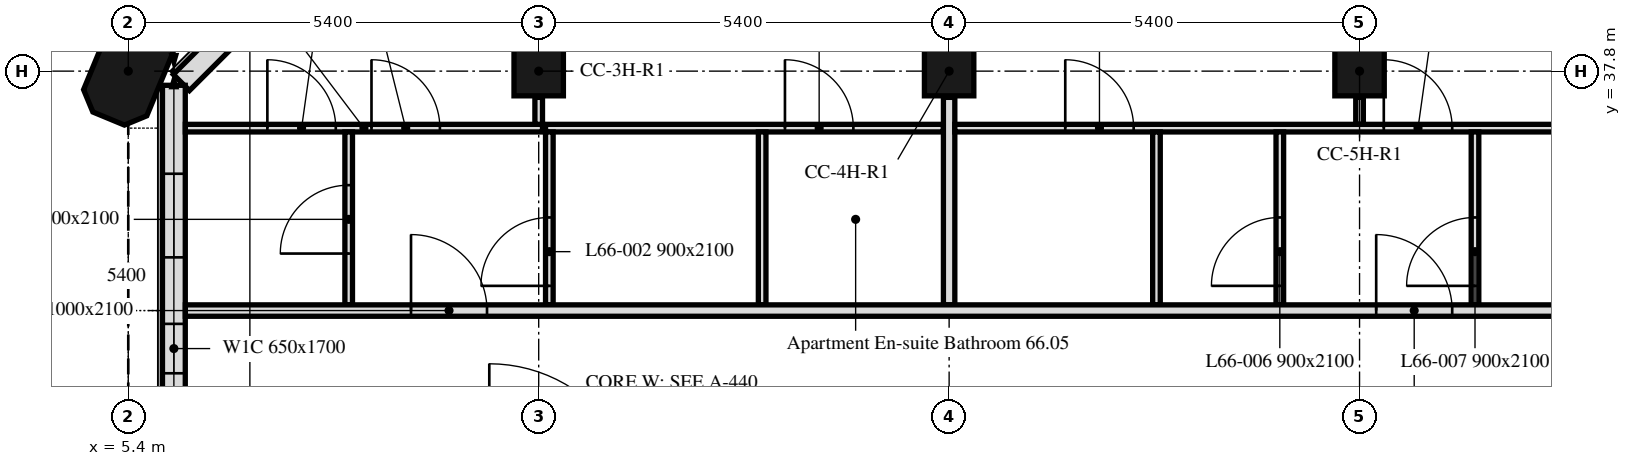
"""IFC4 building model, lengths in metres.
Left out: names, types, materials, properties, quantities, classifications, styles, units other than length and angle.
Written with IfcOpenShell. Run it as: python <this file> out.ifc"""

import sys

from ifc_helpers import new_model, si_unit, direction, frame, frame_2d, origin, origin_2d, place, context, subcontext, project, spatial, polyline, rectangle, outline, extrude, element, fill, save


model = new_model("IFC4")
c1 = context("Model", 3, precision=1e-05, world=origin(), true_north=direction((0.0, 1.0)))
c2 = subcontext(c1, "Body", "Model", "MODEL_VIEW")
j1 = project(units=[si_unit("LENGTHUNIT", "METRE"), si_unit("PLANEANGLEUNIT", "RADIAN")], contexts=[c1])
p1 = place(None, origin())
s1 = spatial("IfcSite", under=j1, at=p1, CompositionType="ELEMENT")
p2 = place(p1, origin())
s2 = spatial("IfcBuilding", under=s1, at=p2, CompositionType="ELEMENT")
p3 = place(p2, frame((0.0, 0.0, 271.9)))
s3 = spatial("IfcBuildingStorey", under=s2, at=p3, CompositionType="ELEMENT", Elevation=271.9)
p4 = place(p3, frame((5.4, 37.8, 0.0), z_axis=(0.0, 0.0, 1.0), x_axis=(0.382683432365, 0.923879532511, 0.0)))
e1 = element("IfcColumn", 1, at=p4, inside=s3, PredefinedType="COLUMN", context=c2, shape_type="SweptSolid", body=[
    extrude(outline(polyline([(-0.45, -0.45), (0.45, -0.45), (0.675, -0.225), (0.675, 0.225), (0.45, 0.45), (-0.45, 0.45), (-0.675, 0.225), (-0.675, -0.225), (-0.45, -0.45)])), origin(), (0.0, 0.0, 1.0), 3.0),
])
for number, where, z_axis, x_axis in (
    (2, (10.8, 37.8, 0.0), (0.0, 0.0, 1.0), (1.0, 0.0, 0.0)),
    (3, (16.2, 37.8, 0.0), (0.0, 0.0, 1.0), (1.0, 0.0, 0.0)),
    (4, (21.6, 37.8, 0.0), (0.0, 0.0, 1.0), (1.0, 0.0, 0.0)),
):
    element("IfcColumn", number, at=place(p3, frame(where, z_axis=z_axis, x_axis=x_axis)), inside=s3, PredefinedType="COLUMN", context=c2, shape_type="SweptSolid", body=[
        extrude(rectangle(XDim=0.65, YDim=0.65, at=origin_2d()), origin(), (0.0, 0.0, 1.0), 3.0),
    ])
p5 = place(p3, frame((10.949, 42.501, 0.0), z_axis=(0.0, 0.0, 1.0), x_axis=(-0.707106781187, -0.707106781187, 0.0)))
e5 = element("IfcWall", 5, at=p5, inside=s3, PredefinedType="SOLIDWALL", context=c2, shape_type="SweptSolid", body=[
    extrude(rectangle(XDim=6.86, YDim=0.3, at=frame_2d((3.43, 0.0))), origin(), (0.0, 0.0, 1.0), 3.0),
])
p6 = place(p5, frame((1.73, 0.0, 0.9)))
e6 = element("IfcOpeningElement", 6, at=p6, cuts=e5, PredefinedType="OPENING", context=c2, shape_type="SweptSolid", body=[
    extrude(rectangle(XDim=3.4, YDim=1.7, at=frame_2d((1.7, 0.85))), frame((0.0, 0.16, 0.0), z_axis=(0.0, -1.0, 0.0), x_axis=(1.0, 0.0, 0.0)), (0.0, 0.0, 1.0), 0.32),
])
p7 = place(p3, frame((6.0, 37.614, 0.0), z_axis=(0.0, 0.0, 1.0), x_axis=(0.0, -1.0, 0.0)))
e7 = element("IfcWall", 7, at=p7, inside=s3, PredefinedType="SOLIDWALL", context=c2, shape_type="SweptSolid", body=[
    extrude(rectangle(XDim=5.214, YDim=0.3, at=frame_2d((2.607, 0.0))), origin(), (0.0, 0.0, 1.0), 3.0),
])
p8 = place(p7, frame((1.164, 0.0, 0.9)))
e8 = element("IfcOpeningElement", 8, at=p8, cuts=e7, PredefinedType="OPENING", context=c2, shape_type="SweptSolid", body=[
    extrude(rectangle(XDim=1.1, YDim=1.7, at=frame_2d((0.55, 0.85))), frame((0.0, 0.16, 0.0), z_axis=(0.0, -1.0, 0.0), x_axis=(1.0, 0.0, 0.0)), (0.0, 0.0, 1.0), 0.32),
])
p9 = place(p7, frame((3.139, 0.0, 0.9)))
e9 = element("IfcOpeningElement", 9, at=p9, cuts=e7, PredefinedType="OPENING", context=c2, shape_type="SweptSolid", body=[
    extrude(rectangle(XDim=0.65, YDim=1.7, at=frame_2d((0.325, 0.85))), frame((0.0, 0.16, 0.0), z_axis=(0.0, -1.0, 0.0), x_axis=(1.0, 0.0, 0.0)), (0.0, 0.0, 1.0), 0.32),
])
p10 = place(p3, frame((6.151, 37.05, 0.0), z_axis=(0.0, 0.0, 1.0), x_axis=(1.0, 0.0, 0.0)))
e10 = element("IfcWall", 10, at=p10, inside=s3, PredefinedType="PARTITIONING", context=c2, shape_type="SweptSolid", body=[
    extrude(rectangle(XDim=4.699, YDim=0.1, at=frame_2d((2.35, 0.0))), origin(), (0.0, 0.0, 1.0), 3.0),
])
p11 = place(p10, frame((1.079, 0.0, 0.0)))
e11 = element("IfcOpeningElement", 11, at=p11, cuts=e10, PredefinedType="OPENING", context=c2, shape_type="SweptSolid", body=[
    extrude(rectangle(XDim=0.9, YDim=2.1, at=frame_2d((0.45, 1.05))), frame((0.0, 0.05, 0.0), z_axis=(0.0, -1.0, 0.0), x_axis=(1.0, 0.0, 0.0)), (0.0, 0.0, 1.0), 0.1),
])
p12 = place(p10, frame((2.449, 0.0, 0.0)))
e12 = element("IfcOpeningElement", 12, at=p12, cuts=e10, PredefinedType="OPENING", context=c2, shape_type="SweptSolid", body=[
    extrude(rectangle(XDim=0.9, YDim=2.1, at=frame_2d((0.45, 1.05))), frame((0.0, 0.05, 0.0), z_axis=(0.0, -1.0, 0.0), x_axis=(1.0, 0.0, 0.0)), (0.0, 0.0, 1.0), 0.1),
])
p13 = place(p3, frame((10.8, 37.1, 0.0), z_axis=(0.0, 0.0, 1.0), x_axis=(0.0, 1.0, 0.0)))
e13 = element("IfcWall", 13, at=p13, inside=s3, PredefinedType="PARTITIONING", context=c2, shape_type="SweptSolid", body=[
    extrude(rectangle(XDim=0.355, YDim=0.1, at=frame_2d((0.177, 0.0))), origin(), (0.0, 0.0, 1.0), 3.0),
])
p14 = place(p3, frame((10.89, 37.05, 0.0), z_axis=(0.0, 0.0, 1.0), x_axis=(1.0, 0.0, 0.0)))
e14 = element("IfcWall", 14, at=p14, inside=s3, PredefinedType="PARTITIONING", context=c2, shape_type="SweptSolid", body=[
    extrude(rectangle(XDim=5.235, YDim=0.1, at=frame_2d((2.618, 0.0))), origin(), (0.0, 0.0, 1.0), 3.0),
])
p15 = place(p14, frame((3.15, 0.0, 0.0)))
e15 = element("IfcOpeningElement", 15, at=p15, cuts=e14, PredefinedType="OPENING", context=c2, shape_type="SweptSolid", body=[
    extrude(rectangle(XDim=0.9, YDim=2.1, at=frame_2d((0.45, 1.05))), frame((0.0, 0.05, 0.0), z_axis=(0.0, -1.0, 0.0), x_axis=(1.0, 0.0, 0.0)), (0.0, 0.0, 1.0), 0.1),
])
p16 = place(p3, frame((8.3, 34.725, 0.0), z_axis=(0.0, 0.0, 1.0), x_axis=(0.0, 1.0, 0.0)))
e16 = element("IfcWall", 16, at=p16, inside=s3, PredefinedType="PARTITIONING", context=c2, shape_type="SweptSolid", body=[
    extrude(rectangle(XDim=2.275, YDim=0.1, at=frame_2d((1.137, 0.0))), origin(), (0.0, 0.0, 1.0), 3.0),
])
p17 = place(p16, frame((0.675, 0.0, 0.0)))
e17 = element("IfcOpeningElement", 17, at=p17, cuts=e16, PredefinedType="OPENING", context=c2, shape_type="SweptSolid", body=[
    extrude(rectangle(XDim=0.9, YDim=2.1, at=frame_2d((0.45, 1.05))), frame((0.0, 0.05, 0.0), z_axis=(0.0, -1.0, 0.0), x_axis=(1.0, 0.0, 0.0)), (0.0, 0.0, 1.0), 0.1),
])
p18 = place(p3, frame((10.94, 34.725, 0.0), z_axis=(0.0, 0.0, 1.0), x_axis=(0.0, 1.0, 0.0)))
e18 = element("IfcWall", 18, at=p18, inside=s3, PredefinedType="PARTITIONING", context=c2, shape_type="SweptSolid", body=[
    extrude(rectangle(XDim=2.275, YDim=0.1, at=frame_2d((1.137, 0.0))), origin(), (0.0, 0.0, 1.0), 3.0),
])
p19 = place(p18, frame((0.25, 0.0, 0.0)))
e19 = element("IfcOpeningElement", 19, at=p19, cuts=e18, PredefinedType="OPENING", context=c2, shape_type="SweptSolid", body=[
    extrude(rectangle(XDim=0.9, YDim=2.1, at=frame_2d((0.45, 1.05))), frame((0.0, 0.05, 0.0), z_axis=(0.0, -1.0, 0.0), x_axis=(1.0, 0.0, 0.0)), (0.0, 0.0, 1.0), 0.1),
])
p20 = place(p3, frame((13.74, 34.725, 0.0), z_axis=(0.0, 0.0, 1.0), x_axis=(0.0, 1.0, 0.0)))
e20 = element("IfcWall", 20, at=p20, inside=s3, PredefinedType="PARTITIONING", context=c2, shape_type="SweptSolid", body=[
    extrude(rectangle(XDim=2.275, YDim=0.1, at=frame_2d((1.137, 0.0))), origin(), (0.0, 0.0, 1.0), 3.0),
])
p21 = place(p3, frame((16.2, 34.725, 0.0), z_axis=(0.0, 0.0, 1.0), x_axis=(0.0, 1.0, 0.0)))
e21 = element("IfcWall", 21, at=p21, inside=s3, PredefinedType="PARTITIONING", context=c2, shape_type="SweptSolid", body=[
    extrude(rectangle(XDim=2.73, YDim=0.15, at=frame_2d((1.365, 0.0))), origin(), (0.0, 0.0, 1.0), 3.0),
])
p22 = place(p3, frame((21.6, 37.1, 0.0), z_axis=(0.0, 0.0, 1.0), x_axis=(0.0, 1.0, 0.0)))
e22 = element("IfcWall", 22, at=p22, inside=s3, PredefinedType="PARTITIONING", context=c2, shape_type="SweptSolid", body=[
    extrude(rectangle(XDim=0.355, YDim=0.1, at=frame_2d((0.177, 0.0))), origin(), (0.0, 0.0, 1.0), 3.0),
])
p23 = place(p3, frame((16.275, 37.05, 0.0), z_axis=(0.0, 0.0, 1.0), x_axis=(1.0, 0.0, 0.0)))
e23 = element("IfcWall", 23, at=p23, inside=s3, PredefinedType="PARTITIONING", context=c2, shape_type="SweptSolid", body=[
    extrude(rectangle(XDim=16.05, YDim=0.1, at=frame_2d((8.025, 0.0))), origin(), (0.0, 0.0, 1.0), 3.0),
])
p24 = place(p23, frame((1.453, 0.0, 0.0)))
e24 = element("IfcOpeningElement", 24, at=p24, cuts=e23, PredefinedType="OPENING", context=c2, shape_type="SweptSolid", body=[
    extrude(rectangle(XDim=0.9, YDim=2.1, at=frame_2d((0.45, 1.05))), frame((0.0, 0.05, 0.0), z_axis=(0.0, -1.0, 0.0), x_axis=(1.0, 0.0, 0.0)), (0.0, 0.0, 1.0), 0.1),
])
p25 = place(p23, frame((12.125, 0.0, 0.0)))
e25 = element("IfcOpeningElement", 25, at=p25, cuts=e23, PredefinedType="OPENING", context=c2, shape_type="SweptSolid", body=[
    extrude(rectangle(XDim=0.9, YDim=2.1, at=frame_2d((0.45, 1.05))), frame((0.0, 0.05, 0.0), z_axis=(0.0, -1.0, 0.0), x_axis=(1.0, 0.0, 0.0)), (0.0, 0.0, 1.0), 0.1),
])
p26 = place(p23, frame((13.625, 0.0, 0.0)))
e26 = element("IfcOpeningElement", 26, at=p26, cuts=e23, PredefinedType="OPENING", context=c2, shape_type="SweptSolid", body=[
    extrude(rectangle(XDim=0.9, YDim=2.1, at=frame_2d((0.45, 1.05))), frame((0.0, 0.05, 0.0), z_axis=(0.0, -1.0, 0.0), x_axis=(1.0, 0.0, 0.0)), (0.0, 0.0, 1.0), 0.1),
])
p27 = place(p23, frame((5.644, 0.0, 0.0)))
e27 = element("IfcOpeningElement", 27, at=p27, cuts=e23, PredefinedType="OPENING", context=c2, shape_type="SweptSolid", body=[
    extrude(rectangle(XDim=0.9, YDim=2.1, at=frame_2d((0.45, 1.05))), frame((0.0, 0.05, 0.0), z_axis=(0.0, -1.0, 0.0), x_axis=(1.0, 0.0, 0.0)), (0.0, 0.0, 1.0), 0.1),
])
p28 = place(p3, frame((18.928, 34.725, 0.0), z_axis=(0.0, 0.0, 1.0), x_axis=(0.0, 1.0, 0.0)))
e28 = element("IfcWall", 28, at=p28, inside=s3, PredefinedType="PARTITIONING", context=c2, shape_type="SweptSolid", body=[
    extrude(rectangle(XDim=2.275, YDim=0.1, at=frame_2d((1.137, 0.0))), origin(), (0.0, 0.0, 1.0), 3.0),
])
p29 = place(p3, frame((20.551, 34.725, 0.0), z_axis=(0.0, 0.0, 1.0), x_axis=(0.0, 1.0, 0.0)))
e29 = element("IfcWall", 29, at=p29, inside=s3, PredefinedType="PARTITIONING", context=c2, shape_type="SweptSolid", body=[
    extrude(rectangle(XDim=2.275, YDim=0.1, at=frame_2d((1.137, 0.0))), origin(), (0.0, 0.0, 1.0), 3.0),
])
p30 = place(p29, frame((0.25, 0.0, 0.0)))
e30 = element("IfcOpeningElement", 30, at=p30, cuts=e29, PredefinedType="OPENING", context=c2, shape_type="SweptSolid", body=[
    extrude(rectangle(XDim=0.9, YDim=2.1, at=frame_2d((0.45, 1.05))), frame((0.0, 0.05, 0.0), z_axis=(0.0, -1.0, 0.0), x_axis=(1.0, 0.0, 0.0)), (0.0, 0.0, 1.0), 0.1),
])
p31 = place(p3, frame((23.119, 34.725, 0.0), z_axis=(0.0, 0.0, 1.0), x_axis=(0.0, 1.0, 0.0)))
e31 = element("IfcWall", 31, at=p31, inside=s3, PredefinedType="PARTITIONING", context=c2, shape_type="SweptSolid", body=[
    extrude(rectangle(XDim=2.275, YDim=0.1, at=frame_2d((1.137, 0.0))), origin(), (0.0, 0.0, 1.0), 3.0),
])
p32 = place(p31, frame((0.25, 0.0, 0.0)))
e32 = element("IfcOpeningElement", 32, at=p32, cuts=e31, PredefinedType="OPENING", context=c2, shape_type="SweptSolid", body=[
    extrude(rectangle(XDim=0.9, YDim=2.1, at=frame_2d((0.45, 1.05))), frame((0.0, 0.05, 0.0), z_axis=(0.0, -1.0, 0.0), x_axis=(1.0, 0.0, 0.0)), (0.0, 0.0, 1.0), 0.1),
])
p33 = place(p3, frame((6.151, 34.65, 0.0), z_axis=(0.0, 0.0, 1.0), x_axis=(1.0, 0.0, 0.0)))
e33 = element("IfcWall", 33, at=p33, inside=s3, PredefinedType="PARTITIONING", context=c2, shape_type="SweptSolid", body=[
    extrude(rectangle(XDim=41.698, YDim=0.15, at=frame_2d((20.849, 0.0))), origin(), (0.0, 0.0, 1.0), 3.0),
])
p34 = place(p33, frame((2.969, 0.0, 0.0)))
e34 = element("IfcOpeningElement", 34, at=p34, cuts=e33, PredefinedType="OPENING", context=c2, shape_type="SweptSolid", body=[
    extrude(rectangle(XDim=1.0, YDim=2.1, at=frame_2d((0.5, 1.05))), frame((0.0, 0.075, 0.0), z_axis=(0.0, -1.0, 0.0), x_axis=(1.0, 0.0, 0.0)), (0.0, 0.0, 1.0), 0.15),
])
p35 = place(p33, frame((15.668, 0.0, 0.0)))
e35 = element("IfcOpeningElement", 35, at=p35, cuts=e33, PredefinedType="OPENING", context=c2, shape_type="SweptSolid", body=[
    extrude(rectangle(XDim=1.0, YDim=2.1, at=frame_2d((0.5, 1.05))), frame((0.0, 0.075, 0.0), z_axis=(0.0, -1.0, 0.0), x_axis=(1.0, 0.0, 0.0)), (0.0, 0.0, 1.0), 0.15),
])
p36 = place(p33, frame((32.054, 0.0, 0.0)))
e36 = element("IfcOpeningElement", 36, at=p36, cuts=e33, PredefinedType="OPENING", context=c2, shape_type="SweptSolid", body=[
    extrude(rectangle(XDim=1.0, YDim=2.1, at=frame_2d((0.5, 1.05))), frame((0.0, 0.075, 0.0), z_axis=(0.0, -1.0, 0.0), x_axis=(1.0, 0.0, 0.0)), (0.0, 0.0, 1.0), 0.15),
])
p37 = place(p8, origin())
e37 = element("IfcWindow", 37, at=p37, inside=s3, PartitioningType="SINGLE_PANEL", PredefinedType="WINDOW", context=c2, shape_type="SweptSolid", body=[
    extrude(rectangle(XDim=1.1, YDim=1.7, at=frame_2d((0.55, 0.85))), frame((0.0, 0.03, 0.0), z_axis=(0.0, -1.0, 0.0), x_axis=(1.0, 0.0, 0.0)), (0.0, 0.0, 1.0), 0.06),
])
fill(e8, e37)
p38 = place(p9, origin())
e38 = element("IfcWindow", 38, at=p38, inside=s3, PartitioningType="SINGLE_PANEL", PredefinedType="WINDOW", context=c2, shape_type="SweptSolid", body=[
    extrude(rectangle(XDim=0.65, YDim=1.7, at=frame_2d((0.325, 0.85))), frame((0.0, 0.03, 0.0), z_axis=(0.0, -1.0, 0.0), x_axis=(1.0, 0.0, 0.0)), (0.0, 0.0, 1.0), 0.06),
])
fill(e9, e38)
p39 = place(p15, origin())
e39 = element("IfcDoor", 39, at=p39, inside=s3, OperationType="SINGLE_SWING_LEFT", PredefinedType="DOOR", context=c2, shape_type="SweptSolid", body=[
    extrude(rectangle(XDim=0.9, YDim=2.1, at=frame_2d((0.45, 1.05))), frame((0.0, 0.025, 0.0), z_axis=(0.0, -1.0, 0.0), x_axis=(1.0, 0.0, 0.0)), (0.0, 0.0, 1.0), 0.05),
])
fill(e15, e39)
p40 = place(p19, origin())
e40 = element("IfcDoor", 40, at=p40, inside=s3, OperationType="SINGLE_SWING_LEFT", PredefinedType="DOOR", context=c2, shape_type="SweptSolid", body=[
    extrude(rectangle(XDim=0.9, YDim=2.1, at=frame_2d((0.45, 1.05))), frame((0.0, 0.025, 0.0), z_axis=(0.0, -1.0, 0.0), x_axis=(1.0, 0.0, 0.0)), (0.0, 0.0, 1.0), 0.05),
])
fill(e19, e40)
p41 = place(p24, origin())
e41 = element("IfcDoor", 41, at=p41, inside=s3, OperationType="SINGLE_SWING_RIGHT", PredefinedType="DOOR", context=c2, shape_type="SweptSolid", body=[
    extrude(rectangle(XDim=0.9, YDim=2.1, at=frame_2d((0.45, 1.05))), frame((0.0, 0.025, 0.0), z_axis=(0.0, -1.0, 0.0), x_axis=(1.0, 0.0, 0.0)), (0.0, 0.0, 1.0), 0.05),
])
fill(e24, e41)
p42 = place(p30, origin())
e42 = element("IfcDoor", 42, at=p42, inside=s3, OperationType="SINGLE_SWING_RIGHT", PredefinedType="DOOR", context=c2, shape_type="SweptSolid", body=[
    extrude(rectangle(XDim=0.9, YDim=2.1, at=frame_2d((0.45, 1.05))), frame((0.0, 0.025, 0.0), z_axis=(0.0, -1.0, 0.0), x_axis=(1.0, 0.0, 0.0)), (0.0, 0.0, 1.0), 0.05),
])
fill(e30, e42)
p43 = place(p32, origin())
e43 = element("IfcDoor", 43, at=p43, inside=s3, OperationType="SINGLE_SWING_LEFT", PredefinedType="DOOR", context=c2, shape_type="SweptSolid", body=[
    extrude(rectangle(XDim=0.9, YDim=2.1, at=frame_2d((0.45, 1.05))), frame((0.0, 0.025, 0.0), z_axis=(0.0, -1.0, 0.0), x_axis=(1.0, 0.0, 0.0)), (0.0, 0.0, 1.0), 0.05),
])
fill(e32, e43)
p44 = place(p11, origin())
e44 = element("IfcDoor", 44, at=p44, inside=s3, OperationType="SINGLE_SWING_RIGHT", PredefinedType="DOOR", context=c2, shape_type="SweptSolid", body=[
    extrude(rectangle(XDim=0.9, YDim=2.1, at=frame_2d((0.45, 1.05))), frame((0.0, 0.025, 0.0), z_axis=(0.0, -1.0, 0.0), x_axis=(1.0, 0.0, 0.0)), (0.0, 0.0, 1.0), 0.05),
])
fill(e11, e44)
p45 = place(p17, origin())
e45 = element("IfcDoor", 45, at=p45, inside=s3, OperationType="SINGLE_SWING_LEFT", PredefinedType="DOOR", context=c2, shape_type="SweptSolid", body=[
    extrude(rectangle(XDim=0.9, YDim=2.1, at=frame_2d((0.45, 1.05))), frame((0.0, 0.025, 0.0), z_axis=(0.0, -1.0, 0.0), x_axis=(1.0, 0.0, 0.0)), (0.0, 0.0, 1.0), 0.05),
])
fill(e17, e45)
p46 = place(p12, origin())
e46 = element("IfcDoor", 46, at=p46, inside=s3, OperationType="SINGLE_SWING_LEFT", PredefinedType="DOOR", context=c2, shape_type="SweptSolid", body=[
    extrude(rectangle(XDim=0.9, YDim=2.1, at=frame_2d((0.45, 1.05))), frame((0.0, 0.025, 0.0), z_axis=(0.0, -1.0, 0.0), x_axis=(1.0, 0.0, 0.0)), (0.0, 0.0, 1.0), 0.05),
])
fill(e12, e46)
p47 = place(p27, origin())
e47 = element("IfcDoor", 47, at=p47, inside=s3, OperationType="SINGLE_SWING_RIGHT", PredefinedType="DOOR", context=c2, shape_type="SweptSolid", body=[
    extrude(rectangle(XDim=0.9, YDim=2.1, at=frame_2d((0.45, 1.05))), frame((0.0, 0.025, 0.0), z_axis=(0.0, -1.0, 0.0), x_axis=(1.0, 0.0, 0.0)), (0.0, 0.0, 1.0), 0.05),
])
fill(e27, e47)
p48 = place(p34, origin())
e48 = element("IfcDoor", 48, at=p48, inside=s3, OperationType="SINGLE_SWING_RIGHT", PredefinedType="DOOR", context=c2, shape_type="SweptSolid", body=[
    extrude(rectangle(XDim=1.0, YDim=2.1, at=frame_2d((0.5, 1.05))), frame((0.0, 0.025, 0.0), z_axis=(0.0, -1.0, 0.0), x_axis=(1.0, 0.0, 0.0)), (0.0, 0.0, 1.0), 0.05),
])
fill(e34, e48)
p49 = place(p35, origin())
e49 = element("IfcDoor", 49, at=p49, inside=s3, OperationType="SINGLE_SWING_LEFT", PredefinedType="DOOR", context=c2, shape_type="SweptSolid", body=[
    extrude(rectangle(XDim=1.0, YDim=2.1, at=frame_2d((0.5, 1.05))), frame((0.0, 0.025, 0.0), z_axis=(0.0, -1.0, 0.0), x_axis=(1.0, 0.0, 0.0)), (0.0, 0.0, 1.0), 0.05),
])
fill(e35, e49)
save(model, sys.argv[1])
